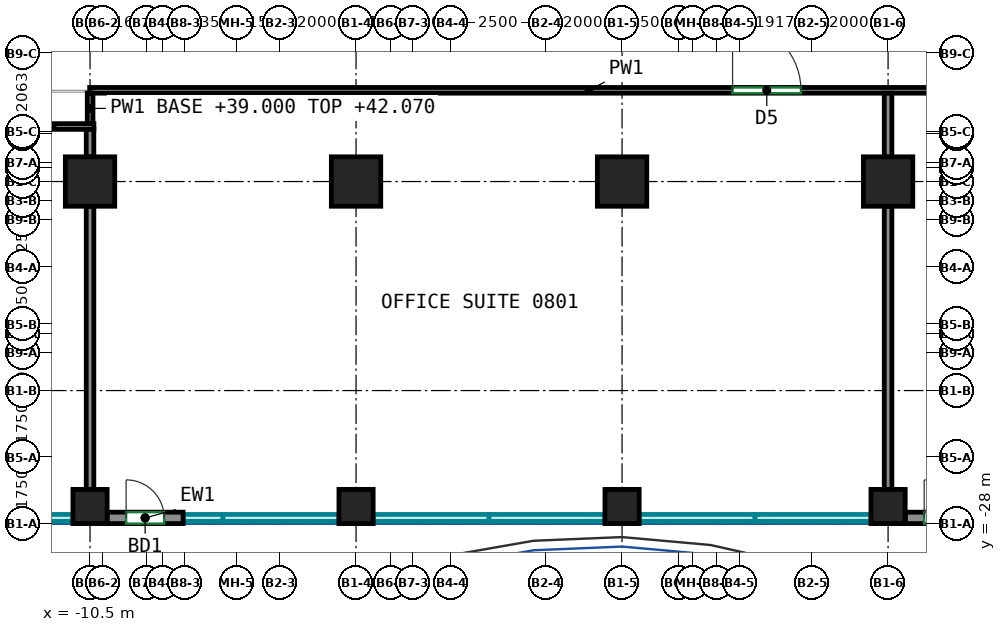
"""IFC4 building model, lengths in metres.
Left out: names, types, materials, properties, quantities, classifications, styles, units other than length and angle.
Written with IfcOpenShell. Run it as: python <this file> out.ifc"""

import sys

from ifc_helpers import new_model, si_unit, direction, frame, frame_2d, origin, origin_2d, place, context, subcontext, project, spatial, rectangle, extrude, source, transform, mapped, element, fill, save


model = new_model("IFC4")
c1 = context("Model", 3, precision=1e-05, world=origin(), true_north=direction((0.0, 1.0)))
c2 = subcontext(c1, "Body", "Model", "MODEL_VIEW")
j1 = project(units=[si_unit("LENGTHUNIT", "METRE"), si_unit("PLANEANGLEUNIT", "RADIAN")], contexts=[c1])
p1 = place(None, origin())
s1 = spatial("IfcSite", under=j1, at=p1, CompositionType="ELEMENT")
p2 = place(p1, origin())
s2 = spatial("IfcBuilding", under=s1, at=p2, CompositionType="ELEMENT")
p3 = place(p2, frame((0.0, 0.0, 39.0)))
s3 = spatial("IfcBuildingStorey", under=s2, at=p3, CompositionType="ELEMENT", Elevation=39.0)
m1 = source(origin(), c2, "Body", "SweptSolid", [
    extrude(rectangle(XDim=0.9, YDim=0.9, at=origin_2d()), origin(), (0.0, 0.0, 1.0), 3.72),
])
p4 = place(p3, frame((-10.5, -27.55, 0.0), z_axis=(0.0, 0.0, 1.0), x_axis=(1.0, 0.0, 0.0)))
e1 = element("IfcColumn", 1, at=p4, inside=s3, PredefinedType="COLUMN", context=c2, shape_type="MappedRepresentation", body=[
    mapped(m1, transform((0.0, 0.0, 0.0))),
])
m2 = source(origin(), c2, "Body", "SweptSolid", [
    extrude(rectangle(XDim=1.3, YDim=1.3, at=origin_2d()), origin(), (0.0, 0.0, 1.0), 3.72),
])
p5 = place(p3, frame((-10.5, -19.0, 0.0), z_axis=(0.0, 0.0, 1.0), x_axis=(1.0, 0.0, 0.0)))
e2 = element("IfcColumn", 2, at=p5, inside=s3, PredefinedType="COLUMN", context=c2, shape_type="MappedRepresentation", body=[
    mapped(m2, transform((0.0, 0.0, 0.0))),
])
p6 = place(p3, frame((-3.5, -27.55, 0.0), z_axis=(0.0, 0.0, 1.0), x_axis=(1.0, 0.0, 0.0)))
e3 = element("IfcColumn", 3, at=p6, inside=s3, PredefinedType="COLUMN", context=c2, shape_type="MappedRepresentation", body=[
    mapped(m1, transform((0.0, 0.0, 0.0))),
])
p7 = place(p3, frame((-3.5, -19.0, 0.0), z_axis=(0.0, 0.0, 1.0), x_axis=(1.0, 0.0, 0.0)))
e4 = element("IfcColumn", 4, at=p7, inside=s3, PredefinedType="COLUMN", context=c2, shape_type="MappedRepresentation", body=[
    mapped(m2, transform((0.0, 0.0, 0.0))),
])
p8 = place(p3, frame((3.5, -27.55, 0.0), z_axis=(0.0, 0.0, 1.0), x_axis=(1.0, 0.0, 0.0)))
e5 = element("IfcColumn", 5, at=p8, inside=s3, PredefinedType="COLUMN", context=c2, shape_type="MappedRepresentation", body=[
    mapped(m1, transform((0.0, 0.0, 0.0))),
])
p9 = place(p3, frame((3.5, -19.0, 0.0), z_axis=(0.0, 0.0, 1.0), x_axis=(1.0, 0.0, 0.0)))
e6 = element("IfcColumn", 6, at=p9, inside=s3, PredefinedType="COLUMN", context=c2, shape_type="MappedRepresentation", body=[
    mapped(m2, transform((0.0, 0.0, 0.0))),
])
p10 = place(p3, frame((10.5, -27.55, 0.0), z_axis=(0.0, 0.0, 1.0), x_axis=(1.0, 0.0, 0.0)))
e7 = element("IfcColumn", 7, at=p10, inside=s3, PredefinedType="COLUMN", context=c2, shape_type="MappedRepresentation", body=[
    mapped(m1, transform((0.0, 0.0, 0.0))),
])
p11 = place(p3, frame((10.5, -19.0, 0.0), z_axis=(0.0, 0.0, 1.0), x_axis=(1.0, 0.0, 0.0)))
e8 = element("IfcColumn", 8, at=p11, inside=s3, PredefinedType="COLUMN", context=c2, shape_type="MappedRepresentation", body=[
    mapped(m2, transform((0.0, 0.0, 0.0))),
])
m3 = source(origin(), c2, "Body", "SweptSolid", [
    extrude(rectangle(XDim=2.0, YDim=0.3, at=frame_2d((1.0, 0.0))), origin(), (0.0, 0.0, 1.0), 3.72),
])
p12 = place(p3, frame((-10.05, -27.85, 0.0), z_axis=(0.0, 0.0, 1.0), x_axis=(1.0, 0.0, 0.0)))
e9 = element("IfcWall", 9, at=p12, inside=s3, PredefinedType="SOLIDWALL", context=c2, shape_type="MappedRepresentation", body=[
    mapped(m3, transform((0.0, 0.0, 0.0))),
])
p13 = place(p12, frame((0.5, 0.0, 0.0)))
e10 = element("IfcOpeningElement", 10, at=p13, cuts=e9, PredefinedType="OPENING", context=c2, shape_type="SweptSolid", body=[
    extrude(rectangle(XDim=1.0, YDim=2.1, at=frame_2d((0.5, 1.05))), frame((0.0, 0.16, 0.0), z_axis=(0.0, -1.0, 0.0), x_axis=(1.0, 0.0, 0.0)), (0.0, 0.0, 1.0), 0.32),
])
p14 = place(p3, frame((10.95, -27.85, 0.0), z_axis=(0.0, 0.0, 1.0), x_axis=(1.0, 0.0, 0.0)))
e11 = element("IfcWall", 11, at=p14, inside=s3, PredefinedType="SOLIDWALL", context=c2, shape_type="MappedRepresentation", body=[
    mapped(m3, transform((0.0, 0.0, 0.0))),
])
p15 = place(p14, frame((0.5, 0.0, 0.0)))
e12 = element("IfcOpeningElement", 12, at=p15, cuts=e11, PredefinedType="OPENING", context=c2, shape_type="SweptSolid", body=[
    extrude(rectangle(XDim=1.0, YDim=2.1, at=frame_2d((0.5, 1.05))), frame((0.0, 0.16, 0.0), z_axis=(0.0, -1.0, 0.0), x_axis=(1.0, 0.0, 0.0)), (0.0, 0.0, 1.0), 0.32),
])
p16 = place(p3, frame((-12.602, -17.552, 0.0), z_axis=(0.0, 0.0, 1.0), x_axis=(1.0, 0.0, 0.0)))
e13 = element("IfcWall", 13, at=p16, inside=s3, PredefinedType="PARTITIONING", context=c2, shape_type="SweptSolid", body=[
    extrude(rectangle(XDim=2.204, YDim=0.15, at=frame_2d((1.102, 0.0))), origin(), (0.0, 0.0, 1.0), 3.72),
])
p17 = place(p3, frame((-10.51, -16.6, 0.0), z_axis=(0.0, 0.0, 1.0), x_axis=(1.0, 0.0, 0.0)))
e14 = element("IfcWall", 14, at=p17, inside=s3, PredefinedType="PARTITIONING", context=c2, shape_type="SweptSolid", body=[
    extrude(rectangle(XDim=26.285, YDim=0.15, at=frame_2d((13.143, 0.0))), origin(), (0.0, 0.0, 1.0), 3.72),
])
p18 = place(p17, frame((16.918, 0.0, 0.0)))
e15 = element("IfcOpeningElement", 15, at=p18, cuts=e14, PredefinedType="OPENING", context=c2, shape_type="SweptSolid", body=[
    extrude(rectangle(XDim=1.8, YDim=2.1, at=frame_2d((0.9, 1.05))), frame((0.0, 0.085, 0.0), z_axis=(0.0, -1.0, 0.0), x_axis=(1.0, 0.0, 0.0)), (0.0, 0.0, 1.0), 0.17),
])
p19 = place(p3, frame((-10.498, -17.477, 0.0), z_axis=(0.0, 0.0, 1.0), x_axis=(0.0, 1.0, 0.0)))
e16 = element("IfcWall", 16, at=p19, inside=s3, PredefinedType="PARTITIONING", context=c2, shape_type="SweptSolid", body=[
    extrude(rectangle(XDim=0.802, YDim=0.15, at=frame_2d((0.401, 0.0))), origin(), (0.0, 0.0, 1.0), 3.07),
])
p20 = place(p3, frame((-10.5, -18.35, 0.0), z_axis=(0.0, 0.0, 1.0), x_axis=(0.0, 1.0, 0.0)))
e17 = element("IfcWall", 17, at=p20, inside=s3, PredefinedType="PARTITIONING", context=c2, shape_type="SweptSolid", body=[
    extrude(rectangle(XDim=0.723, YDim=0.2, at=frame_2d((0.362, 0.0))), origin(), (0.0, 0.0, 1.0), 3.07),
])
p21 = place(p3, frame((-10.5, -27.1, 0.0), z_axis=(0.0, 0.0, 1.0), x_axis=(0.0, 1.0, 0.0)))
e18 = element("IfcWall", 18, at=p21, inside=s3, PredefinedType="PARTITIONING", context=c2, shape_type="SweptSolid", body=[
    extrude(rectangle(XDim=7.45, YDim=0.2, at=frame_2d((3.725, 0.0))), origin(), (0.0, 0.0, 1.0), 3.07),
])
p22 = place(p3, frame((10.5, -18.35, 0.0), z_axis=(0.0, 0.0, 1.0), x_axis=(0.0, 1.0, 0.0)))
e19 = element("IfcWall", 19, at=p22, inside=s3, PredefinedType="PARTITIONING", context=c2, shape_type="SweptSolid", body=[
    extrude(rectangle(XDim=1.674, YDim=0.2, at=frame_2d((0.837, 0.0))), origin(), (0.0, 0.0, 1.0), 3.07),
])
p23 = place(p3, frame((10.5, -27.1, 0.0), z_axis=(0.0, 0.0, 1.0), x_axis=(0.0, 1.0, 0.0)))
e20 = element("IfcWall", 20, at=p23, inside=s3, PredefinedType="PARTITIONING", context=c2, shape_type="SweptSolid", body=[
    extrude(rectangle(XDim=7.45, YDim=0.2, at=frame_2d((3.725, 0.0))), origin(), (0.0, 0.0, 1.0), 3.07),
])
p24 = place(p13, origin())
e21 = element("IfcDoor", 21, at=p24, inside=s3, OperationType="SINGLE_SWING_LEFT", PredefinedType="DOOR", context=c2, shape_type="SweptSolid", body=[
    extrude(rectangle(XDim=1.0, YDim=2.1, at=frame_2d((0.5, 1.05))), frame((0.0, 0.025, 0.0), z_axis=(0.0, -1.0, 0.0), x_axis=(1.0, 0.0, 0.0)), (0.0, 0.0, 1.0), 0.05),
])
fill(e10, e21)
p25 = place(p15, origin())
e22 = element("IfcDoor", 22, at=p25, inside=s3, OperationType="SINGLE_SWING_LEFT", PredefinedType="DOOR", context=c2, shape_type="SweptSolid", body=[
    extrude(rectangle(XDim=1.0, YDim=2.1, at=frame_2d((0.5, 1.05))), frame((0.0, 0.025, 0.0), z_axis=(0.0, -1.0, 0.0), x_axis=(1.0, 0.0, 0.0)), (0.0, 0.0, 1.0), 0.05),
])
fill(e12, e22)
p26 = place(p18, origin())
e23 = element("IfcDoor", 23, at=p26, inside=s3, OperationType="DOUBLE_DOOR_SINGLE_SWING", PredefinedType="DOOR", context=c2, shape_type="SweptSolid", body=[
    extrude(rectangle(XDim=1.8, YDim=2.1, at=frame_2d((0.9, 1.05))), frame((0.0, 0.025, 0.0), z_axis=(0.0, -1.0, 0.0), x_axis=(1.0, 0.0, 0.0)), (0.0, 0.0, 1.0), 0.05),
])
fill(e15, e23)
save(model, sys.argv[1])
